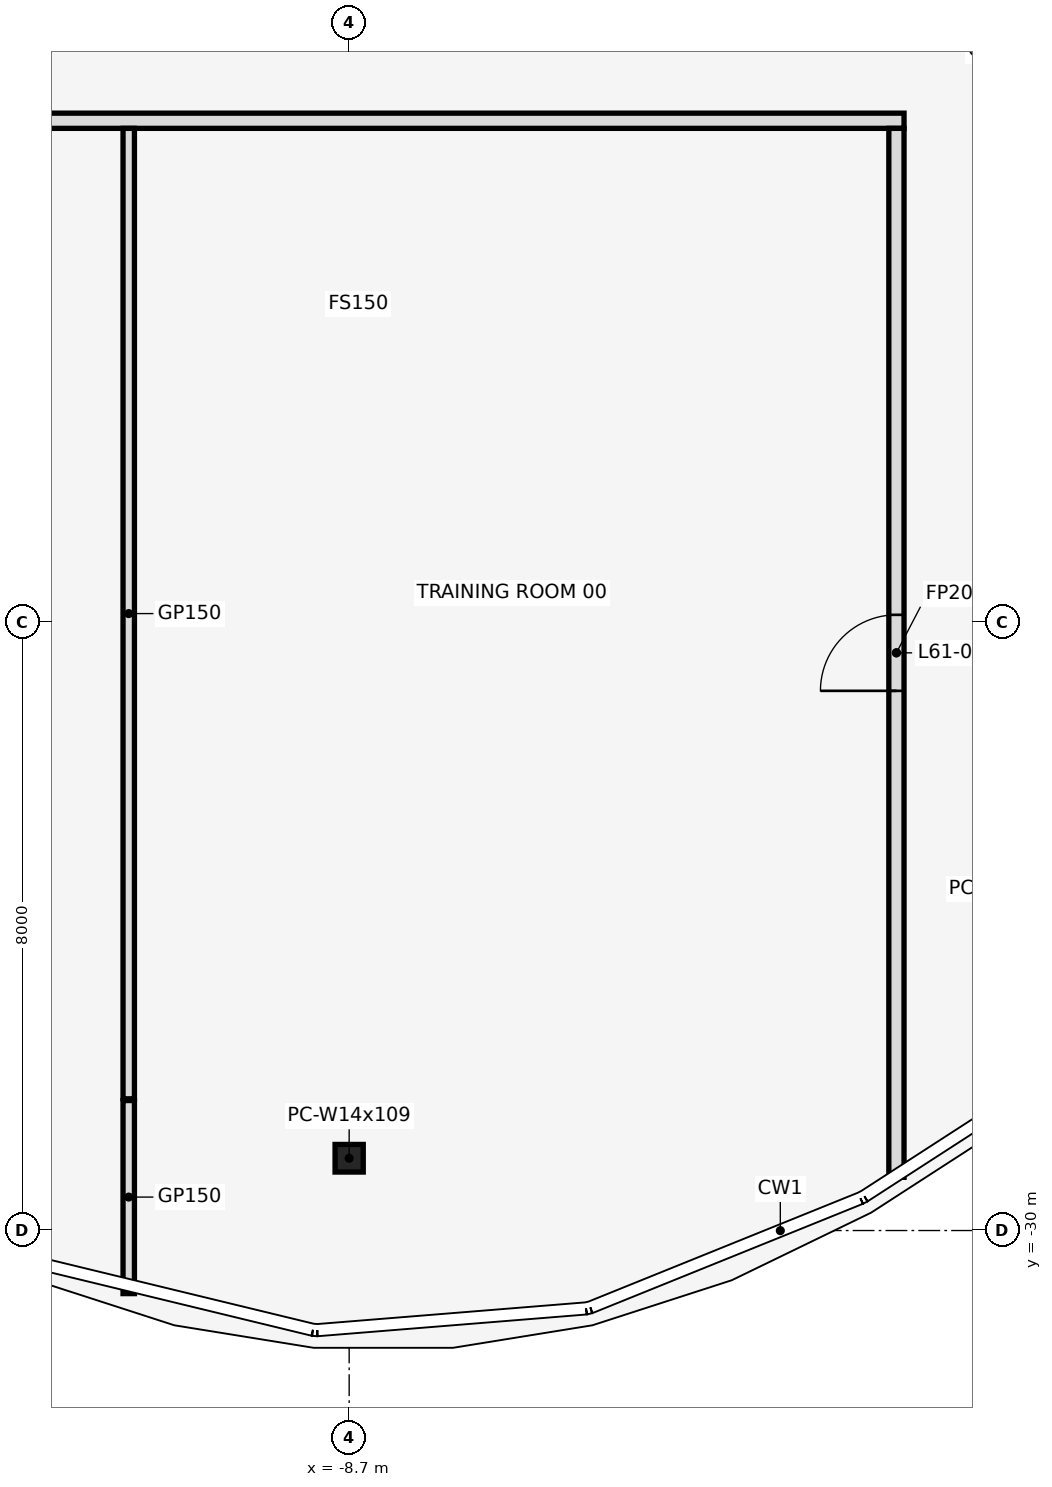
"""IFC4 building model, lengths in metres.
Left out: names, types, materials, properties, quantities, classifications, styles, units other than length and angle.
Written with IfcOpenShell. Run it as: python <this file> out.ifc"""

import sys

from ifc_helpers import new_model, si_unit, direction, frame, frame_2d, origin, origin_2d, place, context, subcontext, project, spatial, rectangle, i_section, extrude, element, fill, save


model = new_model("IFC4")
c1 = context("Model", 3, precision=1e-05, world=origin(), true_north=direction((0.0, 1.0)))
c2 = subcontext(c1, "Body", "Model", "MODEL_VIEW")
j1 = project(units=[si_unit("LENGTHUNIT", "METRE"), si_unit("PLANEANGLEUNIT", "RADIAN")], contexts=[c1])
p1 = place(None, origin())
s1 = spatial("IfcSite", under=j1, at=p1, CompositionType="ELEMENT")
p2 = place(p1, origin())
s2 = spatial("IfcBuilding", under=s1, at=p2, CompositionType="ELEMENT")
p3 = place(p2, frame((0.0, 0.0, 270.8)))
s3 = spatial("IfcBuildingStorey", under=s2, at=p3, CompositionType="ELEMENT", Elevation=270.8)
p4 = place(p3, frame((-8.7, -29.049, 0.0), z_axis=(0.0, 0.0, 1.0), x_axis=(1.0, 0.0, 0.0)))
e1 = element("IfcColumn", 1, at=p4, inside=s3, PredefinedType="COLUMN", context=c2, shape_type="SweptSolid", body=[
    extrude(i_section(OverallWidth=0.371, OverallDepth=0.363, WebThickness=0.013, FlangeThickness=0.022, at=origin_2d()), origin(), (0.0, 0.0, 1.0), 4.2),
])
p5 = place(p3, frame((-33.34, -15.4, 0.0), z_axis=(0.0, 0.0, 1.0), x_axis=(1.0, 0.0, 0.0)))
e2 = element("IfcWall", 2, at=p5, inside=s3, PredefinedType="PARTITIONING", context=c2, shape_type="SweptSolid", body=[
    extrude(rectangle(XDim=31.94, YDim=0.2, at=frame_2d((15.97, 0.0))), origin(), (0.0, 0.0, 1.0), 3.118),
])
p6 = place(p5, frame((1.7, 0.0, 0.0)))
e3 = element("IfcOpeningElement", 3, at=p6, cuts=e2, PredefinedType="OPENING", context=c2, shape_type="SweptSolid", body=[
    extrude(rectangle(XDim=1.0, YDim=2.1, at=frame_2d((0.5, 1.05))), frame((0.0, 0.112, 0.0), z_axis=(0.0, -1.0, 0.0), x_axis=(1.0, 0.0, 0.0)), (0.0, 0.0, 1.0), 0.224),
])
p7 = place(p5, frame((5.34, 0.0, 0.0)))
e4 = element("IfcOpeningElement", 4, at=p7, cuts=e2, PredefinedType="OPENING", context=c2, shape_type="SweptSolid", body=[
    extrude(rectangle(XDim=0.9, YDim=2.1, at=frame_2d((0.45, 1.05))), frame((0.0, 0.112, 0.0), z_axis=(0.0, -1.0, 0.0), x_axis=(1.0, 0.0, 0.0)), (0.0, 0.0, 1.0), 0.224),
])
p8 = place(p5, frame((11.14, 0.0, 0.0)))
e5 = element("IfcOpeningElement", 5, at=p8, cuts=e2, PredefinedType="OPENING", context=c2, shape_type="SweptSolid", body=[
    extrude(rectangle(XDim=1.0, YDim=2.1, at=frame_2d((0.5, 1.05))), frame((0.0, 0.112, 0.0), z_axis=(0.0, -1.0, 0.0), x_axis=(1.0, 0.0, 0.0)), (0.0, 0.0, 1.0), 0.224),
])
p9 = place(p5, frame((18.34, 0.0, 0.0)))
e6 = element("IfcOpeningElement", 6, at=p9, cuts=e2, PredefinedType="OPENING", context=c2, shape_type="SweptSolid", body=[
    extrude(rectangle(XDim=1.0, YDim=2.1, at=frame_2d((0.5, 1.05))), frame((0.0, 0.112, 0.0), z_axis=(0.0, -1.0, 0.0), x_axis=(1.0, 0.0, 0.0)), (0.0, 0.0, 1.0), 0.224),
])
p10 = place(p3, frame((-11.6, -30.83, 0.0), z_axis=(0.0, 0.0, 1.0), x_axis=(0.0, 1.0, 0.0)))
e7 = element("IfcWall", 7, at=p10, inside=s3, PredefinedType="PARTITIONING", context=c2, shape_type="SweptSolid", body=[
    extrude(rectangle(XDim=2.54, YDim=0.15, at=frame_2d((1.27, 0.0))), origin(), (0.0, 0.0, 1.0), 3.118),
])
p11 = place(p3, frame((-11.6, -28.267, 0.0), z_axis=(0.0, 0.0, 1.0), x_axis=(0.0, 1.0, 0.0)))
e8 = element("IfcWall", 8, at=p11, inside=s3, PredefinedType="PARTITIONING", context=c2, shape_type="SweptSolid", body=[
    extrude(rectangle(XDim=12.767, YDim=0.15, at=frame_2d((6.384, 0.0))), origin(), (0.0, 0.0, 1.0), 3.118),
])
p12 = place(p3, frame((-1.5, -29.3, 0.0), z_axis=(0.0, 0.0, 1.0), x_axis=(0.0, 1.0, 0.0)))
e9 = element("IfcWall", 9, at=p12, inside=s3, PredefinedType="PARTITIONING", context=c2, shape_type="SweptSolid", body=[
    extrude(rectangle(XDim=13.8, YDim=0.2, at=frame_2d((6.9, 0.0))), origin(), (0.0, 0.0, 1.0), 3.118),
])
p13 = place(p12, frame((6.4, 0.0, 0.0)))
e10 = element("IfcOpeningElement", 10, at=p13, cuts=e9, PredefinedType="OPENING", context=c2, shape_type="SweptSolid", body=[
    extrude(rectangle(XDim=1.0, YDim=2.1, at=frame_2d((0.5, 1.05))), frame((0.0, 0.112, 0.0), z_axis=(0.0, -1.0, 0.0), x_axis=(1.0, 0.0, 0.0)), (0.0, 0.0, 1.0), 0.224),
])
p14 = place(p13, origin())
e11 = element("IfcDoor", 11, at=p14, inside=s3, OperationType="SINGLE_SWING_LEFT", PredefinedType="DOOR", context=c2, shape_type="SweptSolid", body=[
    extrude(rectangle(XDim=1.0, YDim=2.1, at=frame_2d((0.5, 1.05))), frame((0.0, 0.025, 0.0), z_axis=(0.0, -1.0, 0.0), x_axis=(1.0, 0.0, 0.0)), (0.0, 0.0, 1.0), 0.05),
])
fill(e10, e11)
save(model, sys.argv[1])
